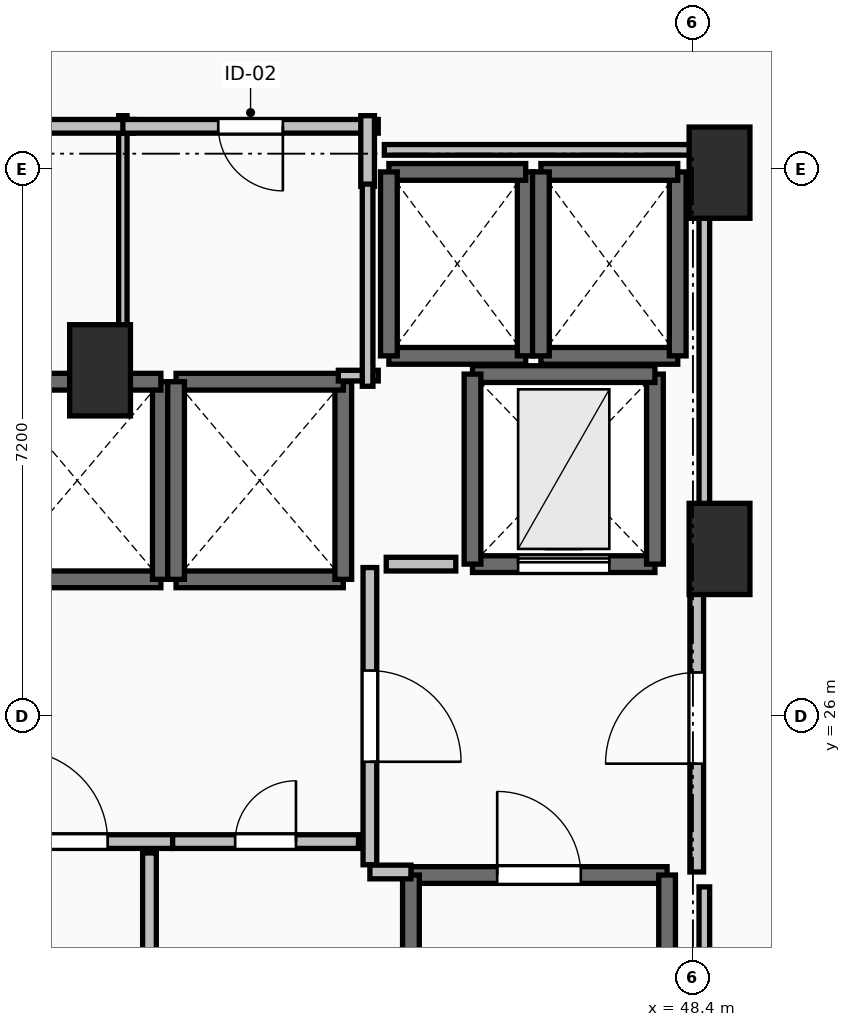
"""IFC4 building model, lengths in metres.
Left out: names, types, materials, properties, quantities, classifications, styles, units other than length and angle.
Written with IfcOpenShell. Run it as: python <this file> out.ifc"""

import sys

from ifc_helpers import new_model, si_unit, direction, frame, frame_2d, origin, origin_2d, place, context, subcontext, project, spatial, rectangle, extrude, element, fill, save


model = new_model("IFC4")
c1 = context("Model", 3, precision=1e-05, world=origin(), true_north=direction((0.0, 1.0)))
c2 = subcontext(c1, "Body", "Model", "MODEL_VIEW")
j1 = project(units=[si_unit("LENGTHUNIT", "METRE"), si_unit("PLANEANGLEUNIT", "RADIAN")], contexts=[c1])
p1 = place(None, origin())
s1 = spatial("IfcSite", under=j1, at=p1, CompositionType="ELEMENT")
p2 = place(p1, origin())
s2 = spatial("IfcBuilding", under=s1, at=p2, CompositionType="ELEMENT")
p3 = place(p2, frame((0.0, 0.0, 27.5)))
s3 = spatial("IfcBuildingStorey", under=s2, at=p3, CompositionType="ELEMENT", Elevation=27.5)
for number, where, z_axis, x_axis in (
    (1, (48.75, 33.15, 0.0), (0.0, 0.0, 1.0), (1.0, 0.0, 0.0)),
    (2, (48.75, 28.2, 0.0), (0.0, 0.0, 1.0), (1.0, 0.0, 0.0)),
    (3, (40.6, 30.55, 0.0), (0.0, 0.0, 1.0), (1.0, 0.0, 0.0)),
):
    element("IfcColumn", number, at=place(p3, frame(where, z_axis=z_axis, x_axis=x_axis)), inside=s3, PredefinedType="PILASTER", context=c2, shape_type="SweptSolid", body=[
        extrude(rectangle(XDim=0.8, YDim=1.2, at=origin_2d()), origin(), (0.0, 0.0, 1.0), 3.5),
    ])
p4 = place(p3, frame((44.69, 23.91, 0.0), z_axis=(0.0, 0.0, 1.0), x_axis=(1.0, 0.0, 0.0)))
e4 = element("IfcWall", 4, at=p4, inside=s3, PredefinedType="SOLIDWALL", context=c2, shape_type="SweptSolid", body=[
    extrude(rectangle(XDim=3.37, YDim=0.22, at=frame_2d((1.685, 0.0))), origin(), (0.0, 0.0, 1.0), 3.24),
])
p5 = place(p4, frame((1.135, 0.0, 0.0)))
e5 = element("IfcOpeningElement", 5, at=p5, cuts=e4, PredefinedType="OPENING", context=c2, shape_type="SweptSolid", body=[
    extrude(rectangle(XDim=1.1, YDim=2.15, at=frame_2d((0.55, 1.075))), frame((0.0, 0.125, 0.0), z_axis=(0.0, -1.0, 0.0), x_axis=(1.0, 0.0, 0.0)), (0.0, 0.0, 1.0), 0.25),
])
for number, where, z_axis, x_axis in (
    (6, (48.06, 23.91, 0.0), (0.0, 0.0, 1.0), (0.0, -1.0, 0.0)),
    (7, (44.69, 16.49, 0.0), (0.0, 0.0, 1.0), (0.0, 1.0, 0.0)),
):
    element("IfcWall", number, at=place(p3, frame(where, z_axis=z_axis, x_axis=x_axis)), inside=s3, PredefinedType="SOLIDWALL", context=c2, shape_type="SweptSolid", body=[
        extrude(rectangle(XDim=7.42, YDim=0.22, at=frame_2d((3.71, 0.0))), origin(), (0.0, 0.0, 1.0), 3.24),
    ])
p6 = place(p3, frame((39.2, 27.8, 0.0), z_axis=(0.0, 0.0, 1.0), x_axis=(1.0, 0.0, 0.0)))
e8 = element("IfcWall", 8, at=p6, inside=s3, PredefinedType="SOLIDWALL", context=c2, shape_type="SweptSolid", body=[
    extrude(rectangle(XDim=2.2, YDim=0.22, at=frame_2d((1.1, 0.0))), origin(), (0.0, 0.0, 1.0), 3.24),
])
p7 = place(p3, frame((41.4, 27.8, 0.0), z_axis=(0.0, 0.0, 1.0), x_axis=(0.0, 1.0, 0.0)))
e9 = element("IfcWall", 9, at=p7, inside=s3, PredefinedType="SOLIDWALL", context=c2, shape_type="SweptSolid", body=[
    extrude(rectangle(XDim=2.6, YDim=0.22, at=frame_2d((1.3, 0.0))), origin(), (0.0, 0.0, 1.0), 3.24),
])
for number, where, z_axis, x_axis in (
    (10, (41.4, 30.4, 0.0), (0.0, 0.0, 1.0), (-1.0, 0.0, 0.0)),
    (11, (41.6, 27.8, 0.0), (0.0, 0.0, 1.0), (1.0, 0.0, 0.0)),
):
    element("IfcWall", number, at=place(p3, frame(where, z_axis=z_axis, x_axis=x_axis)), inside=s3, PredefinedType="SOLIDWALL", context=c2, shape_type="SweptSolid", body=[
        extrude(rectangle(XDim=2.2, YDim=0.22, at=frame_2d((1.1, 0.0))), origin(), (0.0, 0.0, 1.0), 3.24),
    ])
p8 = place(p3, frame((43.8, 27.8, 0.0), z_axis=(0.0, 0.0, 1.0), x_axis=(0.0, 1.0, 0.0)))
e12 = element("IfcWall", 12, at=p8, inside=s3, PredefinedType="SOLIDWALL", context=c2, shape_type="SweptSolid", body=[
    extrude(rectangle(XDim=2.6, YDim=0.22, at=frame_2d((1.3, 0.0))), origin(), (0.0, 0.0, 1.0), 3.24),
])
p9 = place(p3, frame((43.8, 30.4, 0.0), z_axis=(0.0, 0.0, 1.0), x_axis=(-1.0, 0.0, 0.0)))
e13 = element("IfcWall", 13, at=p9, inside=s3, PredefinedType="SOLIDWALL", context=c2, shape_type="SweptSolid", body=[
    extrude(rectangle(XDim=2.2, YDim=0.22, at=frame_2d((1.1, 0.0))), origin(), (0.0, 0.0, 1.0), 3.24),
])
p10 = place(p3, frame((41.6, 30.4, 0.0), z_axis=(0.0, 0.0, 1.0), x_axis=(0.0, -1.0, 0.0)))
e14 = element("IfcWall", 14, at=p10, inside=s3, PredefinedType="SOLIDWALL", context=c2, shape_type="SweptSolid", body=[
    extrude(rectangle(XDim=2.6, YDim=0.22, at=frame_2d((1.3, 0.0))), origin(), (0.0, 0.0, 1.0), 3.24),
])
p11 = place(p3, frame((44.4, 30.74, 0.0), z_axis=(0.0, 0.0, 1.0), x_axis=(1.0, 0.0, 0.0)))
e15 = element("IfcWall", 15, at=p11, inside=s3, PredefinedType="SOLIDWALL", context=c2, shape_type="SweptSolid", body=[
    extrude(rectangle(XDim=1.8, YDim=0.22, at=frame_2d((0.9, 0.0))), origin(), (0.0, 0.0, 1.0), 3.24),
])
p12 = place(p3, frame((46.2, 30.74, 0.0), z_axis=(0.0, 0.0, 1.0), x_axis=(0.0, 1.0, 0.0)))
e16 = element("IfcWall", 16, at=p12, inside=s3, PredefinedType="SOLIDWALL", context=c2, shape_type="SweptSolid", body=[
    extrude(rectangle(XDim=2.42, YDim=0.22, at=frame_2d((1.21, 0.0))), origin(), (0.0, 0.0, 1.0), 3.24),
])
p13 = place(p3, frame((46.2, 33.16, 0.0), z_axis=(0.0, 0.0, 1.0), x_axis=(-1.0, 0.0, 0.0)))
e17 = element("IfcWall", 17, at=p13, inside=s3, PredefinedType="SOLIDWALL", context=c2, shape_type="SweptSolid", body=[
    extrude(rectangle(XDim=1.8, YDim=0.22, at=frame_2d((0.9, 0.0))), origin(), (0.0, 0.0, 1.0), 3.24),
])
p14 = place(p3, frame((44.4, 33.16, 0.0), z_axis=(0.0, 0.0, 1.0), x_axis=(0.0, -1.0, 0.0)))
e18 = element("IfcWall", 18, at=p14, inside=s3, PredefinedType="SOLIDWALL", context=c2, shape_type="SweptSolid", body=[
    extrude(rectangle(XDim=2.42, YDim=0.22, at=frame_2d((1.21, 0.0))), origin(), (0.0, 0.0, 1.0), 3.24),
])
p15 = place(p3, frame((46.4, 30.74, 0.0), z_axis=(0.0, 0.0, 1.0), x_axis=(1.0, 0.0, 0.0)))
e19 = element("IfcWall", 19, at=p15, inside=s3, PredefinedType="SOLIDWALL", context=c2, shape_type="SweptSolid", body=[
    extrude(rectangle(XDim=1.8, YDim=0.22, at=frame_2d((0.9, 0.0))), origin(), (0.0, 0.0, 1.0), 3.24),
])
p16 = place(p3, frame((48.2, 30.74, 0.0), z_axis=(0.0, 0.0, 1.0), x_axis=(0.0, 1.0, 0.0)))
e20 = element("IfcWall", 20, at=p16, inside=s3, PredefinedType="SOLIDWALL", context=c2, shape_type="SweptSolid", body=[
    extrude(rectangle(XDim=2.42, YDim=0.22, at=frame_2d((1.21, 0.0))), origin(), (0.0, 0.0, 1.0), 3.24),
])
p17 = place(p3, frame((48.2, 33.16, 0.0), z_axis=(0.0, 0.0, 1.0), x_axis=(-1.0, 0.0, 0.0)))
e21 = element("IfcWall", 21, at=p17, inside=s3, PredefinedType="SOLIDWALL", context=c2, shape_type="SweptSolid", body=[
    extrude(rectangle(XDim=1.8, YDim=0.22, at=frame_2d((0.9, 0.0))), origin(), (0.0, 0.0, 1.0), 3.24),
])
p18 = place(p3, frame((46.4, 33.16, 0.0), z_axis=(0.0, 0.0, 1.0), x_axis=(0.0, -1.0, 0.0)))
e22 = element("IfcWall", 22, at=p18, inside=s3, PredefinedType="SOLIDWALL", context=c2, shape_type="SweptSolid", body=[
    extrude(rectangle(XDim=2.42, YDim=0.22, at=frame_2d((1.21, 0.0))), origin(), (0.0, 0.0, 1.0), 3.24),
])
p19 = place(p3, frame((45.5, 28.0, 0.0), z_axis=(0.0, 0.0, 1.0), x_axis=(1.0, 0.0, 0.0)))
e23 = element("IfcWall", 23, at=p19, inside=s3, PredefinedType="SHEAR", context=c2, shape_type="SweptSolid", body=[
    extrude(rectangle(XDim=2.4, YDim=0.22, at=frame_2d((1.2, 0.0))), origin(), (0.0, 0.0, 1.0), 3.24),
])
p20 = place(p19, frame((0.6, 0.0, 0.0)))
e24 = element("IfcOpeningElement", 24, at=p20, cuts=e23, PredefinedType="OPENING", context=c2, shape_type="SweptSolid", body=[
    extrude(rectangle(XDim=1.2, YDim=2.2, at=frame_2d((0.6, 1.1))), frame((0.0, 0.125, 0.0), z_axis=(0.0, -1.0, 0.0), x_axis=(1.0, 0.0, 0.0)), (0.0, 0.0, 1.0), 0.25),
])
p21 = place(p3, frame((47.9, 28.0, 0.0), z_axis=(0.0, 0.0, 1.0), x_axis=(0.0, 1.0, 0.0)))
e25 = element("IfcWall", 25, at=p21, inside=s3, PredefinedType="SHEAR", context=c2, shape_type="SweptSolid", body=[
    extrude(rectangle(XDim=2.5, YDim=0.22, at=frame_2d((1.25, 0.0))), origin(), (0.0, 0.0, 1.0), 3.24),
])
p22 = place(p3, frame((47.9, 30.5, 0.0), z_axis=(0.0, 0.0, 1.0), x_axis=(-1.0, 0.0, 0.0)))
e26 = element("IfcWall", 26, at=p22, inside=s3, PredefinedType="SHEAR", context=c2, shape_type="SweptSolid", body=[
    extrude(rectangle(XDim=2.4, YDim=0.22, at=frame_2d((1.2, 0.0))), origin(), (0.0, 0.0, 1.0), 3.24),
])
p23 = place(p3, frame((45.5, 30.5, 0.0), z_axis=(0.0, 0.0, 1.0), x_axis=(0.0, -1.0, 0.0)))
e27 = element("IfcWall", 27, at=p23, inside=s3, PredefinedType="SHEAR", context=c2, shape_type="SweptSolid", body=[
    extrude(rectangle(XDim=2.5, YDim=0.22, at=frame_2d((1.25, 0.0))), origin(), (0.0, 0.0, 1.0), 3.24),
])
p24 = place(p3, frame((44.15, 27.955, 0.0), z_axis=(0.0, 0.0, 1.0), x_axis=(0.0, -1.0, 0.0)))
e28 = element("IfcWall", 28, at=p24, inside=s3, PredefinedType="PARTITIONING", context=c2, shape_type="SweptSolid", body=[
    extrude(rectangle(XDim=3.91, YDim=0.18, at=frame_2d((1.955, 0.0))), origin(), (0.0, 0.0, 1.0), 3.24),
])
p25 = place(p24, frame((1.355, 0.0, 0.0)))
e29 = element("IfcOpeningElement", 29, at=p25, cuts=e28, PredefinedType="OPENING", context=c2, shape_type="SweptSolid", body=[
    extrude(rectangle(XDim=1.2, YDim=2.15, at=frame_2d((0.6, 1.075))), frame((0.0, 0.105, 0.0), z_axis=(0.0, -1.0, 0.0), x_axis=(1.0, 0.0, 0.0)), (0.0, 0.0, 1.0), 0.21),
])
p26 = place(p3, frame((44.15, 23.95, 0.0), z_axis=(0.0, 0.0, 1.0), x_axis=(1.0, 0.0, 0.0)))
e30 = element("IfcWall", 30, at=p26, inside=s3, PredefinedType="PARTITIONING", context=c2, shape_type="SweptSolid", body=[
    extrude(rectangle(XDim=0.54, YDim=0.18, at=frame_2d((0.27, 0.0))), origin(), (0.0, 0.0, 1.0), 3.24),
])
p27 = place(p3, frame((48.45, 23.95, 0.0), z_axis=(0.0, 0.0, 1.0), x_axis=(0.0, 1.0, 0.0)))
e31 = element("IfcWall", 31, at=p27, inside=s3, PredefinedType="PARTITIONING", context=c2, shape_type="SweptSolid", body=[
    extrude(rectangle(XDim=4.05, YDim=0.18, at=frame_2d((2.025, 0.0))), origin(), (0.0, 0.0, 1.0), 3.24),
])
p28 = place(p27, frame((1.425, 0.0, 0.0)))
e32 = element("IfcOpeningElement", 32, at=p28, cuts=e31, PredefinedType="OPENING", context=c2, shape_type="SweptSolid", body=[
    extrude(rectangle(XDim=1.2, YDim=2.15, at=frame_2d((0.6, 1.075))), frame((0.0, 0.105, 0.0), z_axis=(0.0, -1.0, 0.0), x_axis=(1.0, 0.0, 0.0)), (0.0, 0.0, 1.0), 0.21),
])
p29 = place(p3, frame((38.645, 24.35, 0.0), z_axis=(0.0, 0.0, 1.0), x_axis=(1.0, 0.0, 0.0)))
e33 = element("IfcWall", 33, at=p29, inside=s3, PredefinedType="PARTITIONING", context=c2, shape_type="SweptSolid", body=[
    extrude(rectangle(XDim=2.91, YDim=0.18, at=frame_2d((1.455, 0.0))), origin(), (0.0, 0.0, 1.0), 3.24),
])
p30 = place(p29, frame((0.855, 0.0, 0.0)))
e34 = element("IfcOpeningElement", 34, at=p30, cuts=e33, PredefinedType="OPENING", context=c2, shape_type="SweptSolid", body=[
    extrude(rectangle(XDim=1.2, YDim=2.15, at=frame_2d((0.6, 1.075))), frame((0.0, 0.105, 0.0), z_axis=(0.0, -1.0, 0.0), x_axis=(1.0, 0.0, 0.0)), (0.0, 0.0, 1.0), 0.21),
])
p31 = place(p3, frame((41.555, 24.35, 0.0), z_axis=(0.0, 0.0, 1.0), x_axis=(1.0, 0.0, 0.0)))
e35 = element("IfcWall", 35, at=p31, inside=s3, PredefinedType="PARTITIONING", context=c2, shape_type="SweptSolid", body=[
    extrude(rectangle(XDim=2.445, YDim=0.18, at=frame_2d((1.223, 0.0))), origin(), (0.0, 0.0, 1.0), 3.24),
])
p32 = place(p31, frame((0.823, 0.0, 0.0)))
e36 = element("IfcOpeningElement", 36, at=p32, cuts=e35, PredefinedType="OPENING", context=c2, shape_type="SweptSolid", body=[
    extrude(rectangle(XDim=0.8, YDim=2.05, at=frame_2d((0.4, 1.025))), frame((0.0, 0.105, 0.0), z_axis=(0.0, -1.0, 0.0), x_axis=(1.0, 0.0, 0.0)), (0.0, 0.0, 1.0), 0.21),
])
p33 = place(p3, frame((41.25, 16.32, 0.0), z_axis=(0.0, 0.0, 1.0), x_axis=(0.0, 1.0, 0.0)))
e37 = element("IfcWall", 37, at=p33, inside=s3, PredefinedType="PARTITIONING", context=c2, shape_type="SweptSolid", body=[
    extrude(rectangle(XDim=7.88, YDim=0.18, at=frame_2d((3.94, 0.0))), origin(), (0.0, 0.0, 1.0), 3.24),
])
p34 = place(p33, frame((3.54, 0.0, 0.0)))
e38 = element("IfcOpeningElement", 38, at=p34, cuts=e37, PredefinedType="OPENING", context=c2, shape_type="SweptSolid", body=[
    extrude(rectangle(XDim=0.8, YDim=2.05, at=frame_2d((0.4, 1.025))), frame((0.0, 0.105, 0.0), z_axis=(0.0, -1.0, 0.0), x_axis=(1.0, 0.0, 0.0)), (0.0, 0.0, 1.0), 0.21),
])
p35 = place(p3, frame((40.9, 30.34, 0.0), z_axis=(0.0, 0.0, 1.0), x_axis=(0.0, 1.0, 0.0)))
e39 = element("IfcWall", 39, at=p35, inside=s3, PredefinedType="PARTITIONING", context=c2, shape_type="SweptSolid", body=[
    extrude(rectangle(XDim=3.56, YDim=0.11, at=frame_2d((1.78, 0.0))), origin(), (0.0, 0.0, 1.0), 3.24),
])
p36 = place(p3, frame((41.04, 33.76, 0.0), z_axis=(0.0, 0.0, 1.0), x_axis=(-1.0, 0.0, 0.0)))
e40 = element("IfcWall", 40, at=p36, inside=s3, PredefinedType="PARTITIONING", context=c2, shape_type="SweptSolid", body=[
    extrude(rectangle(XDim=4.84, YDim=0.18, at=frame_2d((2.42, 0.0))), origin(), (0.0, 0.0, 1.0), 3.24),
])
p37 = place(p36, frame((1.995, 0.0, 0.0)))
e41 = element("IfcOpeningElement", 41, at=p37, cuts=e40, PredefinedType="OPENING", context=c2, shape_type="SweptSolid", body=[
    extrude(rectangle(XDim=0.85, YDim=2.1, at=frame_2d((0.425, 1.05))), frame((0.0, 0.105, 0.0), z_axis=(0.0, -1.0, 0.0), x_axis=(1.0, 0.0, 0.0)), (0.0, 0.0, 1.0), 0.21),
])
p38 = place(p3, frame((44.26, 33.76, 0.0), z_axis=(0.0, 0.0, 1.0), x_axis=(-1.0, 0.0, 0.0)))
e42 = element("IfcWall", 42, at=p38, inside=s3, PredefinedType="PARTITIONING", context=c2, shape_type="SweptSolid", body=[
    extrude(rectangle(XDim=3.36, YDim=0.18, at=frame_2d((1.68, 0.0))), origin(), (0.0, 0.0, 1.0), 3.24),
])
p39 = place(p38, frame((1.255, 0.0, 0.0)))
e43 = element("IfcOpeningElement", 43, at=p39, cuts=e42, PredefinedType="OPENING", context=c2, shape_type="SweptSolid", body=[
    extrude(rectangle(XDim=0.85, YDim=2.1, at=frame_2d((0.425, 1.05))), frame((0.0, 0.105, 0.0), z_axis=(0.0, -1.0, 0.0), x_axis=(1.0, 0.0, 0.0)), (0.0, 0.0, 1.0), 0.21),
])
p40 = place(p3, frame((44.12, 32.97, 0.0), z_axis=(0.0, 0.0, 1.0), x_axis=(0.0, 1.0, 0.0)))
e44 = element("IfcWall", 44, at=p40, inside=s3, PredefinedType="PARTITIONING", context=c2, shape_type="SweptSolid", body=[
    extrude(rectangle(XDim=0.93, YDim=0.18, at=frame_2d((0.465, 0.0))), origin(), (0.0, 0.0, 1.0), 3.24),
])
p41 = place(p3, frame((45.28, 28.0, 0.0), z_axis=(0.0, 0.0, 1.0), x_axis=(-1.0, 0.0, 0.0)))
e45 = element("IfcWall", 45, at=p41, inside=s3, PredefinedType="PARTITIONING", context=c2, shape_type="SweptSolid", body=[
    extrude(rectangle(XDim=0.915, YDim=0.18, at=frame_2d((0.458, 0.0))), origin(), (0.0, 0.0, 1.0), 3.24),
])
p42 = place(p3, frame((43.735, 30.48, 0.0), z_axis=(0.0, 0.0, 1.0), x_axis=(1.0, 0.0, 0.0)))
e46 = element("IfcWall", 46, at=p42, inside=s3, PredefinedType="PARTITIONING", context=c2, shape_type="SweptSolid", body=[
    extrude(rectangle(XDim=0.525, YDim=0.14, at=frame_2d((0.262, 0.0))), origin(), (0.0, 0.0, 1.0), 3.24),
])
p43 = place(p3, frame((44.12, 30.34, 0.0), z_axis=(0.0, 0.0, 1.0), x_axis=(0.0, 1.0, 0.0)))
e47 = element("IfcWall", 47, at=p43, inside=s3, PredefinedType="PARTITIONING", context=c2, shape_type="SweptSolid", body=[
    extrude(rectangle(XDim=2.66, YDim=0.14, at=frame_2d((1.33, 0.0))), origin(), (0.0, 0.0, 1.0), 3.24),
])
p44 = place(p3, frame((44.34, 33.45, 0.0), z_axis=(0.0, 0.0, 1.0), x_axis=(1.0, 0.0, 0.0)))
e48 = element("IfcWall", 48, at=p44, inside=s3, PredefinedType="PARTITIONING", context=c2, shape_type="SweptSolid", body=[
    extrude(rectangle(XDim=4.21, YDim=0.14, at=frame_2d((2.105, 0.0))), origin(), (0.0, 0.0, 1.0), 2.432),
])
p45 = place(p3, frame((48.55, 33.45, 0.0), z_axis=(0.0, 0.0, 1.0), x_axis=(0.0, -1.0, 0.0)))
e49 = element("IfcWall", 49, at=p45, inside=s3, PredefinedType="PARTITIONING", context=c2, shape_type="SweptSolid", body=[
    extrude(rectangle(XDim=5.254, YDim=0.14, at=frame_2d((2.627, 0.0))), origin(), (0.0, 0.0, 1.0), 2.432),
])
p46 = place(p3, frame((48.55, 23.754, 0.0), z_axis=(0.0, 0.0, 1.0), x_axis=(0.0, -1.0, 0.0)))
e50 = element("IfcWall", 50, at=p46, inside=s3, PredefinedType="PARTITIONING", context=c2, shape_type="SweptSolid", body=[
    extrude(rectangle(XDim=7.514, YDim=0.14, at=frame_2d((3.757, 0.0))), origin(), (0.0, 0.0, 1.0), 2.432),
])
p47 = place(p5, origin())
e51 = element("IfcDoor", 51, at=p47, inside=s3, OperationType="SINGLE_SWING_LEFT", PredefinedType="DOOR", context=c2, shape_type="SweptSolid", body=[
    extrude(rectangle(XDim=1.1, YDim=2.15, at=frame_2d((0.55, 1.075))), frame((0.0, 0.025, 0.0), z_axis=(0.0, -1.0, 0.0), x_axis=(1.0, 0.0, 0.0)), (0.0, 0.0, 1.0), 0.05),
])
fill(e5, e51)
p48 = place(p20, origin())
e52 = element("IfcDoor", 52, at=p48, inside=s3, OperationType="SLIDING_TO_LEFT", PredefinedType="DOOR", context=c2, shape_type="SweptSolid", body=[
    extrude(rectangle(XDim=1.2, YDim=2.2, at=frame_2d((0.6, 1.1))), frame((0.0, 0.025, 0.0), z_axis=(0.0, -1.0, 0.0), x_axis=(1.0, 0.0, 0.0)), (0.0, 0.0, 1.0), 0.05),
])
fill(e24, e52)
p49 = place(p25, origin())
e53 = element("IfcDoor", 53, at=p49, inside=s3, OperationType="SINGLE_SWING_RIGHT", PredefinedType="DOOR", context=c2, shape_type="SweptSolid", body=[
    extrude(rectangle(XDim=1.2, YDim=2.15, at=frame_2d((0.6, 1.075))), frame((0.0, 0.025, 0.0), z_axis=(0.0, -1.0, 0.0), x_axis=(1.0, 0.0, 0.0)), (0.0, 0.0, 1.0), 0.05),
])
fill(e29, e53)
p50 = place(p28, origin())
e54 = element("IfcDoor", 54, at=p50, inside=s3, OperationType="SINGLE_SWING_LEFT", PredefinedType="DOOR", context=c2, shape_type="SweptSolid", body=[
    extrude(rectangle(XDim=1.2, YDim=2.15, at=frame_2d((0.6, 1.075))), frame((0.0, 0.025, 0.0), z_axis=(0.0, -1.0, 0.0), x_axis=(1.0, 0.0, 0.0)), (0.0, 0.0, 1.0), 0.05),
])
fill(e32, e54)
p51 = place(p30, origin())
e55 = element("IfcDoor", 55, at=p51, inside=s3, OperationType="SINGLE_SWING_LEFT", PredefinedType="DOOR", context=c2, shape_type="SweptSolid", body=[
    extrude(rectangle(XDim=1.2, YDim=2.15, at=frame_2d((0.6, 1.075))), frame((0.0, 0.025, 0.0), z_axis=(0.0, -1.0, 0.0), x_axis=(1.0, 0.0, 0.0)), (0.0, 0.0, 1.0), 0.05),
])
fill(e34, e55)
p52 = place(p32, origin())
e56 = element("IfcDoor", 56, at=p52, inside=s3, OperationType="SINGLE_SWING_RIGHT", PredefinedType="DOOR", context=c2, shape_type="SweptSolid", body=[
    extrude(rectangle(XDim=0.8, YDim=2.05, at=frame_2d((0.4, 1.025))), frame((0.0, 0.025, 0.0), z_axis=(0.0, -1.0, 0.0), x_axis=(1.0, 0.0, 0.0)), (0.0, 0.0, 1.0), 0.05),
])
fill(e36, e56)
p53 = place(p39, origin())
e57 = element("IfcDoor", 57, at=p53, inside=s3, OperationType="SINGLE_SWING_LEFT", PredefinedType="DOOR", context=c2, shape_type="SweptSolid", body=[
    extrude(rectangle(XDim=0.85, YDim=2.1, at=frame_2d((0.425, 1.05))), frame((0.0, 0.025, 0.0), z_axis=(0.0, -1.0, 0.0), x_axis=(1.0, 0.0, 0.0)), (0.0, 0.0, 1.0), 0.05),
])
fill(e43, e57)
save(model, sys.argv[1])
